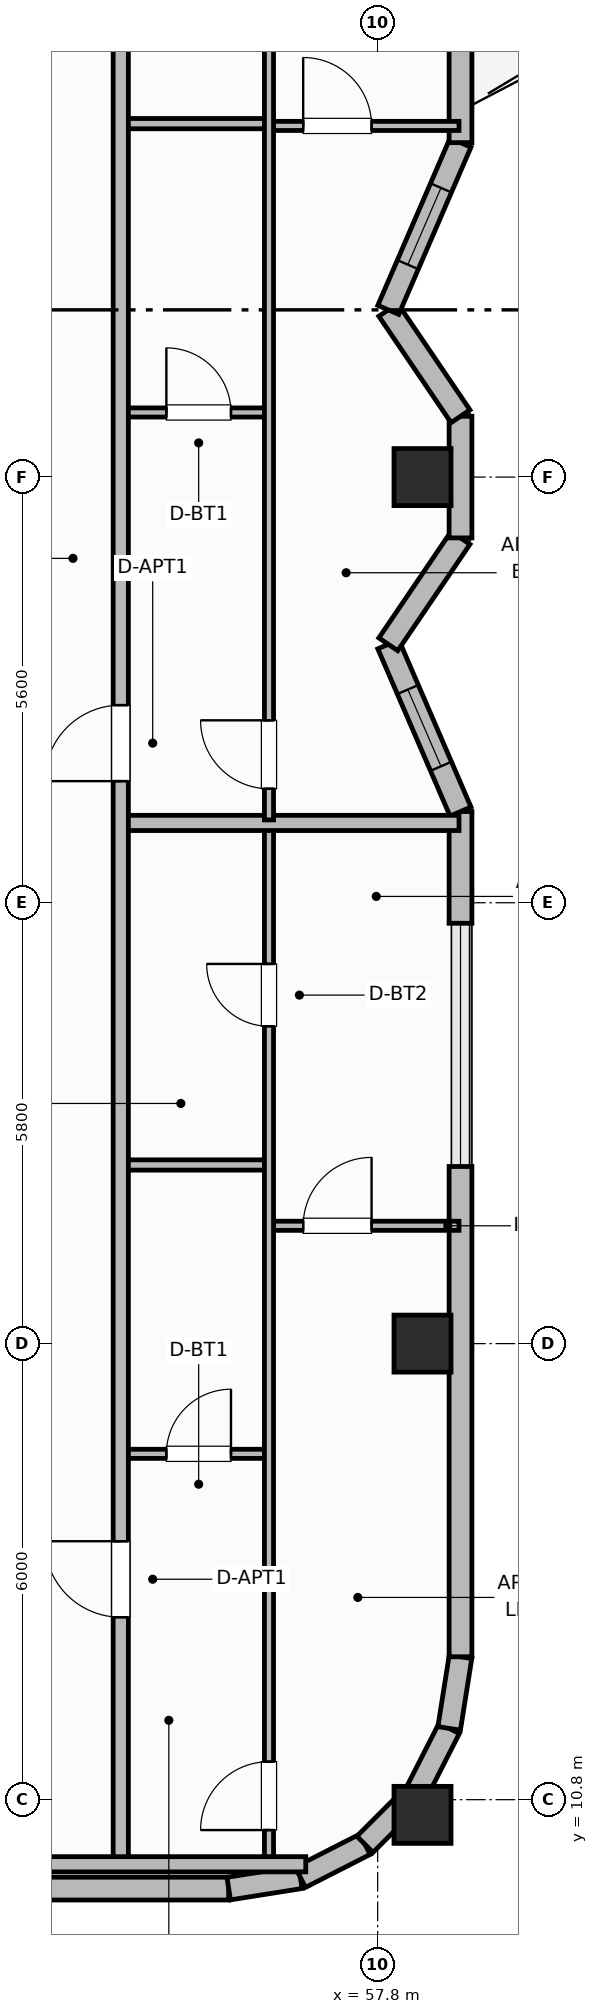
"""IFC4 building model, lengths in metres.
Left out: names, types, materials, properties, quantities, classifications, styles, units other than length and angle.
Written with IfcOpenShell. Run it as: python <this file> out.ifc"""

import sys

from ifc_helpers import new_model, si_unit, direction, frame, frame_2d, origin, origin_2d, place, context, subcontext, project, spatial, rectangle, extrude, element, fill, save


model = new_model("IFC4")
c1 = context("Model", 3, precision=1e-05, world=origin(), true_north=direction((0.0, 1.0)))
c2 = subcontext(c1, "Body", "Model", "MODEL_VIEW")
j1 = project(units=[si_unit("LENGTHUNIT", "METRE"), si_unit("PLANEANGLEUNIT", "RADIAN")], contexts=[c1])
p1 = place(None, origin())
s1 = spatial("IfcSite", under=j1, at=p1, CompositionType="ELEMENT")
p2 = place(p1, origin())
s2 = spatial("IfcBuilding", under=s1, at=p2, CompositionType="ELEMENT")
p3 = place(p2, frame((0.0, 0.0, 289.8)))
s3 = spatial("IfcBuildingStorey", under=s2, at=p3, CompositionType="ELEMENT", Elevation=289.8)
for number, where, z_axis, x_axis in (
    (1, (58.39, 10.6, 0.0), (0.0, 0.0, 1.0), (1.0, 0.0, 0.0)),
    (2, (58.39, 16.8, 0.0), (0.0, 0.0, 1.0), (1.0, 0.0, 0.0)),
    (3, (58.39, 28.2, 0.0), (0.0, 0.0, 1.0), (1.0, 0.0, 0.0)),
):
    element("IfcColumn", number, at=place(p3, frame(where, z_axis=z_axis, x_axis=x_axis)), inside=s3, PredefinedType="COLUMN", context=c2, shape_type="SweptSolid", body=[
        extrude(rectangle(XDim=0.75, YDim=0.75, at=origin_2d()), origin(), (0.0, 0.0, 1.0), 3.7),
    ])
p4 = place(p3, frame((30.21, 9.63, 0.0), z_axis=(0.0, 0.0, 1.0), x_axis=(1.0, 0.0, 0.0)))
e4 = element("IfcWall", 4, at=p4, inside=s3, PredefinedType="SOLIDWALL", context=c2, shape_type="SweptSolid", body=[
    extrude(rectangle(XDim=25.63, YDim=0.3, at=frame_2d((12.815, 0.0))), origin(), (0.0, 0.0, 1.0), 2.73),
])
p5 = place(p4, frame((1.452, 0.0, 0.95)))
e5 = element("IfcOpeningElement", 5, at=p5, cuts=e4, PredefinedType="OPENING", context=c2, shape_type="SweptSolid", body=[
    extrude(rectangle(XDim=1.1, YDim=1.65, at=frame_2d((0.55, 0.825))), frame((0.0, 0.16, 0.0), z_axis=(0.0, -1.0, 0.0), x_axis=(1.0, 0.0, 0.0)), (0.0, 0.0, 1.0), 0.32),
])
p6 = place(p4, frame((6.858, 0.0, 0.95)))
e6 = element("IfcOpeningElement", 6, at=p6, cuts=e4, PredefinedType="OPENING", context=c2, shape_type="SweptSolid", body=[
    extrude(rectangle(XDim=1.1, YDim=1.65, at=frame_2d((0.55, 0.825))), frame((0.0, 0.16, 0.0), z_axis=(0.0, -1.0, 0.0), x_axis=(1.0, 0.0, 0.0)), (0.0, 0.0, 1.0), 0.32),
])
p7 = place(p4, frame((9.562, 0.0, 0.95)))
e7 = element("IfcOpeningElement", 7, at=p7, cuts=e4, PredefinedType="OPENING", context=c2, shape_type="SweptSolid", body=[
    extrude(rectangle(XDim=1.1, YDim=1.65, at=frame_2d((0.55, 0.825))), frame((0.0, 0.16, 0.0), z_axis=(0.0, -1.0, 0.0), x_axis=(1.0, 0.0, 0.0)), (0.0, 0.0, 1.0), 0.32),
])
p8 = place(p4, frame((14.968, 0.0, 0.95)))
e8 = element("IfcOpeningElement", 8, at=p8, cuts=e4, PredefinedType="OPENING", context=c2, shape_type="SweptSolid", body=[
    extrude(rectangle(XDim=1.1, YDim=1.65, at=frame_2d((0.55, 0.825))), frame((0.0, 0.16, 0.0), z_axis=(0.0, -1.0, 0.0), x_axis=(1.0, 0.0, 0.0)), (0.0, 0.0, 1.0), 0.32),
])
p9 = place(p4, frame((17.672, 0.0, 0.95)))
e9 = element("IfcOpeningElement", 9, at=p9, cuts=e4, PredefinedType="OPENING", context=c2, shape_type="SweptSolid", body=[
    extrude(rectangle(XDim=1.1, YDim=1.65, at=frame_2d((0.55, 0.825))), frame((0.0, 0.16, 0.0), z_axis=(0.0, -1.0, 0.0), x_axis=(1.0, 0.0, 0.0)), (0.0, 0.0, 1.0), 0.32),
])
p10 = place(p4, frame((20.025, 0.0, 0.95)))
e10 = element("IfcOpeningElement", 10, at=p10, cuts=e4, PredefinedType="OPENING", context=c2, shape_type="SweptSolid", body=[
    extrude(rectangle(XDim=1.1, YDim=1.65, at=frame_2d((0.55, 0.825))), frame((0.0, 0.16, 0.0), z_axis=(0.0, -1.0, 0.0), x_axis=(1.0, 0.0, 0.0)), (0.0, 0.0, 1.0), 0.32),
])
p11 = place(p3, frame((55.84, 9.63, 0.0), z_axis=(0.0, 0.0, 1.0), x_axis=(0.987663181641, 0.156593229835, 0.0)))
e11 = element("IfcWall", 11, at=p11, inside=s3, PredefinedType="SOLIDWALL", context=c2, shape_type="SweptSolid", body=[
    extrude(rectangle(XDim=0.954, YDim=0.3, at=frame_2d((0.477, 0.0))), origin(), (0.0, 0.0, 1.0), 2.73),
])
for number, where, z_axis, x_axis in (
    (12, (56.782, 9.779, 0.0), (0.0, 0.0, 1.0), (0.891, 0.454, 0.0)),
    (13, (57.633, 10.212, 0.0), (0.0, 0.0, 1.0), (0.707, 0.707, 0.0)),
    (14, (58.308, 10.887, 0.0), (0.0, 0.0, 1.0), (0.454, 0.891, 0.0)),
):
    element("IfcWall", number, at=place(p3, frame(where, z_axis=z_axis, x_axis=x_axis)), inside=s3, PredefinedType="SOLIDWALL", context=c2, shape_type="SweptSolid", body=[
        extrude(rectangle(XDim=0.954, YDim=0.3, at=frame_2d((0.477, 0.0))), origin(), (0.0, 0.0, 1.0), 2.73),
    ])
p12 = place(p3, frame((58.741, 11.738, 0.0), z_axis=(0.0, 0.0, 1.0), x_axis=(0.156343617883, 0.987702725088, 0.0)))
e15 = element("IfcWall", 15, at=p12, inside=s3, PredefinedType="SOLIDWALL", context=c2, shape_type="SweptSolid", body=[
    extrude(rectangle(XDim=0.954, YDim=0.3, at=frame_2d((0.477, 0.0))), origin(), (0.0, 0.0, 1.0), 2.73),
])
p13 = place(p3, frame((58.89, 12.68, 0.0), z_axis=(0.0, 0.0, 1.0), x_axis=(0.0, 1.0, 0.0)))
e16 = element("IfcWall", 16, at=p13, inside=s3, PredefinedType="SOLIDWALL", context=c2, shape_type="SweptSolid", body=[
    extrude(rectangle(XDim=6.45, YDim=0.3, at=frame_2d((3.225, 0.0))), origin(), (0.0, 0.0, 1.0), 2.73),
])
p14 = place(p3, frame((58.89, 22.33, 0.0), z_axis=(0.0, 0.0, 1.0), x_axis=(0.0, 1.0, 0.0)))
e17 = element("IfcWall", 17, at=p14, inside=s3, PredefinedType="SOLIDWALL", context=c2, shape_type="SweptSolid", body=[
    extrude(rectangle(XDim=1.47, YDim=0.3, at=frame_2d((0.735, 0.0))), origin(), (0.0, 0.0, 1.0), 2.73),
])
p15 = place(p3, frame((58.89, 23.8, 0.0), z_axis=(0.0, 0.0, 1.0), x_axis=(-0.396426258231, 0.918066567186, 0.0)))
e18 = element("IfcWall", 18, at=p15, inside=s3, PredefinedType="SOLIDWALL", context=c2, shape_type="SweptSolid", body=[
    extrude(rectangle(XDim=2.396, YDim=0.3, at=frame_2d((1.198, 0.0))), origin(), (0.0, 0.0, 1.0), 2.73),
])
p16 = place(p15, frame((0.648, 0.0, 0.92)))
e19 = element("IfcOpeningElement", 19, at=p16, cuts=e18, PredefinedType="OPENING", context=c2, shape_type="SweptSolid", body=[
    extrude(rectangle(XDim=1.1, YDim=1.65, at=frame_2d((0.55, 0.825))), frame((0.0, 0.16, 0.0), z_axis=(0.0, -1.0, 0.0), x_axis=(1.0, 0.0, 0.0)), (0.0, 0.0, 1.0), 0.32),
])
p17 = place(p3, frame((57.94, 26.0, 0.0), z_axis=(0.0, 0.0, 1.0), x_axis=(0.561508476251, 0.827470985049, 0.0)))
e20 = element("IfcWall", 20, at=p17, inside=s3, PredefinedType="SOLIDWALL", context=c2, shape_type="SweptSolid", body=[
    extrude(rectangle(XDim=1.692, YDim=0.3, at=frame_2d((0.846, 0.0))), origin(), (0.0, 0.0, 1.0), 2.73),
])
p18 = place(p3, frame((58.89, 27.4, 0.0), z_axis=(0.0, 0.0, 1.0), x_axis=(0.0, 1.0, 0.0)))
e21 = element("IfcWall", 21, at=p18, inside=s3, PredefinedType="SOLIDWALL", context=c2, shape_type="SweptSolid", body=[
    extrude(rectangle(XDim=1.6, YDim=0.3, at=frame_2d((0.8, 0.0))), origin(), (0.0, 0.0, 1.0), 2.73),
])
p19 = place(p3, frame((58.89, 29.0, 0.0), z_axis=(0.0, 0.0, 1.0), x_axis=(-0.561508476251, 0.827470985049, 0.0)))
e22 = element("IfcWall", 22, at=p19, inside=s3, PredefinedType="SOLIDWALL", context=c2, shape_type="SweptSolid", body=[
    extrude(rectangle(XDim=1.692, YDim=0.3, at=frame_2d((0.846, 0.0))), origin(), (0.0, 0.0, 1.0), 2.73),
])
p20 = place(p3, frame((57.94, 30.4, 0.0), z_axis=(0.0, 0.0, 1.0), x_axis=(0.396389181543, 0.918082576218, 0.0)))
e23 = element("IfcWall", 23, at=p20, inside=s3, PredefinedType="SOLIDWALL", context=c2, shape_type="SweptSolid", body=[
    extrude(rectangle(XDim=2.396, YDim=0.3, at=frame_2d((1.198, 0.0))), origin(), (0.0, 0.0, 1.0), 2.73),
])
p21 = place(p20, frame((0.648, 0.0, 0.92)))
e24 = element("IfcOpeningElement", 24, at=p21, cuts=e23, PredefinedType="OPENING", context=c2, shape_type="SweptSolid", body=[
    extrude(rectangle(XDim=1.1, YDim=1.65, at=frame_2d((0.55, 0.825))), frame((0.0, 0.16, 0.0), z_axis=(0.0, -1.0, 0.0), x_axis=(1.0, 0.0, 0.0)), (0.0, 0.0, 1.0), 0.32),
])
p22 = place(p3, frame((58.89, 32.6, 0.0), z_axis=(0.0, 0.0, 1.0), x_axis=(0.0, 1.0, 0.0)))
e25 = element("IfcWall", 25, at=p22, inside=s3, PredefinedType="SOLIDWALL", context=c2, shape_type="SweptSolid", body=[
    extrude(rectangle(XDim=11.12, YDim=0.3, at=frame_2d((5.56, 0.0))), origin(), (0.0, 0.0, 1.0), 2.73),
])
p23 = place(p22, frame((2.1, 0.0, 0.0)))
e26 = element("IfcOpeningElement", 26, at=p23, cuts=e25, PredefinedType="OPENING", context=c2, shape_type="SweptSolid", body=[
    extrude(rectangle(XDim=1.6, YDim=2.1, at=frame_2d((0.8, 1.05))), frame((0.0, 0.16, 0.0), z_axis=(0.0, -1.0, 0.0), x_axis=(1.0, 0.0, 0.0)), (0.0, 0.0, 1.0), 0.32),
])
p24 = place(p22, frame((8.283, 0.0, 0.76)))
e27 = element("IfcOpeningElement", 27, at=p24, cuts=e25, PredefinedType="OPENING", context=c2, shape_type="SweptSolid", body=[
    extrude(rectangle(XDim=1.8, YDim=1.85, at=frame_2d((0.9, 0.925))), frame((0.0, 0.16, 0.0), z_axis=(0.0, -1.0, 0.0), x_axis=(1.0, 0.0, 0.0)), (0.0, 0.0, 1.0), 0.32),
])
p25 = place(p3, frame((54.42, 15.35, 0.0), z_axis=(0.0, 0.0, 1.0), x_axis=(1.0, 0.0, 0.0)))
e28 = element("IfcWall", 28, at=p25, inside=s3, PredefinedType="PARTITIONING", context=c2, shape_type="SweptSolid", body=[
    extrude(rectangle(XDim=1.95, YDim=0.12, at=frame_2d((0.975, 0.0))), origin(), (0.0, 0.0, 1.0), 2.56),
])
p26 = place(p25, frame((0.6, 0.0, 0.0)))
e29 = element("IfcOpeningElement", 29, at=p26, cuts=e28, PredefinedType="OPENING", context=c2, shape_type="SweptSolid", body=[
    extrude(rectangle(XDim=0.85, YDim=2.1, at=frame_2d((0.425, 1.05))), frame((0.0, 0.07, 0.0), z_axis=(0.0, -1.0, 0.0), x_axis=(1.0, 0.0, 0.0)), (0.0, 0.0, 1.0), 0.14),
])
p27 = place(p3, frame((54.42, 19.15, 0.0), z_axis=(0.0, 0.0, 1.0), x_axis=(1.0, 0.0, 0.0)))
e30 = element("IfcWall", 30, at=p27, inside=s3, PredefinedType="PARTITIONING", context=c2, shape_type="SweptSolid", body=[
    extrude(rectangle(XDim=1.95, YDim=0.135, at=frame_2d((0.975, 0.0))), origin(), (0.0, 0.0, 1.0), 2.56),
])
p28 = place(p3, frame((56.37, 18.35, 0.0), z_axis=(0.0, 0.0, 1.0), x_axis=(1.0, 0.0, 0.0)))
e31 = element("IfcWall", 31, at=p28, inside=s3, PredefinedType="PARTITIONING", context=c2, shape_type="SweptSolid", body=[
    extrude(rectangle(XDim=2.5, YDim=0.12, at=frame_2d((1.25, 0.0))), origin(), (0.0, 0.0, 1.0), 2.56),
])
p29 = place(p28, frame((0.45, 0.0, 0.0)))
e32 = element("IfcOpeningElement", 32, at=p29, cuts=e31, PredefinedType="OPENING", context=c2, shape_type="SweptSolid", body=[
    extrude(rectangle(XDim=0.9, YDim=2.1, at=frame_2d((0.45, 1.05))), frame((0.0, 0.07, 0.0), z_axis=(0.0, -1.0, 0.0), x_axis=(1.0, 0.0, 0.0)), (0.0, 0.0, 1.0), 0.14),
])
p30 = place(p3, frame((56.37, 9.99, 0.0), z_axis=(0.0, 0.0, 1.0), x_axis=(0.0, 1.0, 0.0)))
e33 = element("IfcWall", 33, at=p30, inside=s3, PredefinedType="PARTITIONING", context=c2, shape_type="SweptSolid", body=[
    extrude(rectangle(XDim=13.62, YDim=0.12, at=frame_2d((6.81, 0.0))), origin(), (0.0, 0.0, 1.0), 2.56),
])
p31 = place(p30, frame((0.41, 0.0, 0.0)))
e34 = element("IfcOpeningElement", 34, at=p31, cuts=e33, PredefinedType="OPENING", context=c2, shape_type="SweptSolid", body=[
    extrude(rectangle(XDim=0.9, YDim=2.1, at=frame_2d((0.45, 1.05))), frame((0.0, 0.07, 0.0), z_axis=(0.0, -1.0, 0.0), x_axis=(1.0, 0.0, 0.0)), (0.0, 0.0, 1.0), 0.14),
])
p32 = place(p30, frame((10.985, 0.0, 0.0)))
e35 = element("IfcOpeningElement", 35, at=p32, cuts=e33, PredefinedType="OPENING", context=c2, shape_type="SweptSolid", body=[
    extrude(rectangle(XDim=0.82, YDim=2.08, at=frame_2d((0.41, 1.04))), frame((0.0, 0.07, 0.0), z_axis=(0.0, -1.0, 0.0), x_axis=(1.0, 0.0, 0.0)), (0.0, 0.0, 1.0), 0.14),
])
p33 = place(p3, frame((54.42, 23.65, 0.0), z_axis=(0.0, 0.0, 1.0), x_axis=(1.0, 0.0, 0.0)))
e36 = element("IfcWall", 36, at=p33, inside=s3, PredefinedType="PARTITIONING", context=c2, shape_type="SweptSolid", body=[
    extrude(rectangle(XDim=4.45, YDim=0.2, at=frame_2d((2.225, 0.0))), origin(), (0.0, 0.0, 1.0), 2.56),
])
p34 = place(p3, frame((54.42, 29.05, 0.0), z_axis=(0.0, 0.0, 1.0), x_axis=(1.0, 0.0, 0.0)))
e37 = element("IfcWall", 37, at=p34, inside=s3, PredefinedType="PARTITIONING", context=c2, shape_type="SweptSolid", body=[
    extrude(rectangle(XDim=1.95, YDim=0.12, at=frame_2d((0.975, 0.0))), origin(), (0.0, 0.0, 1.0), 2.56),
])
p35 = place(p34, frame((0.6, 0.0, 0.0)))
e38 = element("IfcOpeningElement", 38, at=p35, cuts=e37, PredefinedType="OPENING", context=c2, shape_type="SweptSolid", body=[
    extrude(rectangle(XDim=0.85, YDim=2.1, at=frame_2d((0.425, 1.05))), frame((0.0, 0.07, 0.0), z_axis=(0.0, -1.0, 0.0), x_axis=(1.0, 0.0, 0.0)), (0.0, 0.0, 1.0), 0.14),
])
p36 = place(p3, frame((54.42, 32.85, 0.0), z_axis=(0.0, 0.0, 1.0), x_axis=(1.0, 0.0, 0.0)))
e39 = element("IfcWall", 39, at=p36, inside=s3, PredefinedType="PARTITIONING", context=c2, shape_type="SweptSolid", body=[
    extrude(rectangle(XDim=1.95, YDim=0.135, at=frame_2d((0.975, 0.0))), origin(), (0.0, 0.0, 1.0), 2.56),
])
p37 = place(p3, frame((56.37, 32.82, 0.0), z_axis=(0.0, 0.0, 1.0), x_axis=(1.0, 0.0, 0.0)))
e40 = element("IfcWall", 40, at=p37, inside=s3, PredefinedType="PARTITIONING", context=c2, shape_type="SweptSolid", body=[
    extrude(rectangle(XDim=2.5, YDim=0.12, at=frame_2d((1.25, 0.0))), origin(), (0.0, 0.0, 1.0), 2.56),
])
p38 = place(p37, frame((0.45, 0.0, 0.0)))
e41 = element("IfcOpeningElement", 41, at=p38, cuts=e40, PredefinedType="OPENING", context=c2, shape_type="SweptSolid", body=[
    extrude(rectangle(XDim=0.9, YDim=2.1, at=frame_2d((0.45, 1.05))), frame((0.0, 0.07, 0.0), z_axis=(0.0, -1.0, 0.0), x_axis=(1.0, 0.0, 0.0)), (0.0, 0.0, 1.0), 0.14),
])
p39 = place(p3, frame((56.37, 23.69, 0.0), z_axis=(0.0, 0.0, 1.0), x_axis=(0.0, 1.0, 0.0)))
e42 = element("IfcWall", 42, at=p39, inside=s3, PredefinedType="PARTITIONING", context=c2, shape_type="SweptSolid", body=[
    extrude(rectangle(XDim=22.72, YDim=0.12, at=frame_2d((11.36, 0.0))), origin(), (0.0, 0.0, 1.0), 2.56),
])
p40 = place(p39, frame((0.41, 0.0, 0.0)))
e43 = element("IfcOpeningElement", 43, at=p40, cuts=e42, PredefinedType="OPENING", context=c2, shape_type="SweptSolid", body=[
    extrude(rectangle(XDim=0.9, YDim=2.1, at=frame_2d((0.45, 1.05))), frame((0.0, 0.07, 0.0), z_axis=(0.0, -1.0, 0.0), x_axis=(1.0, 0.0, 0.0)), (0.0, 0.0, 1.0), 0.14),
])
p41 = place(p39, frame((13.185, 0.0, 0.0)))
e44 = element("IfcOpeningElement", 44, at=p41, cuts=e42, PredefinedType="OPENING", context=c2, shape_type="SweptSolid", body=[
    extrude(rectangle(XDim=0.82, YDim=2.08, at=frame_2d((0.41, 1.04))), frame((0.0, 0.07, 0.0), z_axis=(0.0, -1.0, 0.0), x_axis=(1.0, 0.0, 0.0)), (0.0, 0.0, 1.0), 0.14),
])
p42 = place(p3, frame((54.42, 9.95, 0.0), z_axis=(0.0, 0.0, 1.0), x_axis=(0.0, 1.0, 0.0)))
e45 = element("IfcWall", 45, at=p42, inside=s3, PredefinedType="PARTITIONING", context=c2, shape_type="SweptSolid", body=[
    extrude(rectangle(XDim=36.5, YDim=0.2, at=frame_2d((18.25, 0.0))), origin(), (0.0, 0.0, 1.0), 2.56),
])
p43 = place(p42, frame((3.25, 0.0, 0.0)))
e46 = element("IfcOpeningElement", 46, at=p43, cuts=e45, PredefinedType="OPENING", context=c2, shape_type="SweptSolid", body=[
    extrude(rectangle(XDim=1.0, YDim=2.15, at=frame_2d((0.5, 1.075))), frame((0.0, 0.11, 0.0), z_axis=(0.0, -1.0, 0.0), x_axis=(1.0, 0.0, 0.0)), (0.0, 0.0, 1.0), 0.22),
])
p44 = place(p42, frame((14.25, 0.0, 0.0)))
e47 = element("IfcOpeningElement", 47, at=p44, cuts=e45, PredefinedType="OPENING", context=c2, shape_type="SweptSolid", body=[
    extrude(rectangle(XDim=1.0, YDim=2.15, at=frame_2d((0.5, 1.075))), frame((0.0, 0.11, 0.0), z_axis=(0.0, -1.0, 0.0), x_axis=(1.0, 0.0, 0.0)), (0.0, 0.0, 1.0), 0.22),
])
p45 = place(p3, frame((53.1, 9.95, 0.0), z_axis=(0.0, 0.0, 1.0), x_axis=(1.0, 0.0, 0.0)))
e48 = element("IfcWall", 48, at=p45, inside=s3, PredefinedType="PARTITIONING", context=c2, shape_type="SweptSolid", body=[
    extrude(rectangle(XDim=3.754, YDim=0.2, at=frame_2d((1.877, 0.0))), origin(), (0.0, 0.0, 1.0), 2.56),
])
p46 = place(p16, origin())
e49 = element("IfcWindow", 49, at=p46, inside=s3, PartitioningType="SINGLE_PANEL", PredefinedType="WINDOW", context=c2, shape_type="SweptSolid", body=[
    extrude(rectangle(XDim=1.1, YDim=1.65, at=frame_2d((0.55, 0.825))), frame((0.0, 0.03, 0.0), z_axis=(0.0, -1.0, 0.0), x_axis=(1.0, 0.0, 0.0)), (0.0, 0.0, 1.0), 0.06),
])
fill(e19, e49)
p47 = place(p21, origin())
e50 = element("IfcWindow", 50, at=p47, inside=s3, PartitioningType="SINGLE_PANEL", PredefinedType="WINDOW", context=c2, shape_type="SweptSolid", body=[
    extrude(rectangle(XDim=1.1, YDim=1.65, at=frame_2d((0.55, 0.825))), frame((0.0, 0.03, 0.0), z_axis=(0.0, -1.0, 0.0), x_axis=(1.0, 0.0, 0.0)), (0.0, 0.0, 1.0), 0.06),
])
fill(e24, e50)
p48 = place(p26, origin())
e51 = element("IfcDoor", 51, at=p48, inside=s3, OperationType="SINGLE_SWING_RIGHT", PredefinedType="DOOR", context=c2, shape_type="SweptSolid", body=[
    extrude(rectangle(XDim=0.85, YDim=2.1, at=frame_2d((0.425, 1.05))), frame((0.0, 0.025, 0.0), z_axis=(0.0, -1.0, 0.0), x_axis=(1.0, 0.0, 0.0)), (0.0, 0.0, 1.0), 0.05),
])
fill(e29, e51)
p49 = place(p29, origin())
e52 = element("IfcDoor", 52, at=p49, inside=s3, OperationType="SINGLE_SWING_RIGHT", PredefinedType="DOOR", context=c2, shape_type="SweptSolid", body=[
    extrude(rectangle(XDim=0.9, YDim=2.1, at=frame_2d((0.45, 1.05))), frame((0.0, 0.025, 0.0), z_axis=(0.0, -1.0, 0.0), x_axis=(1.0, 0.0, 0.0)), (0.0, 0.0, 1.0), 0.05),
])
fill(e32, e52)
p50 = place(p31, origin())
e53 = element("IfcDoor", 53, at=p50, inside=s3, OperationType="SINGLE_SWING_LEFT", PredefinedType="DOOR", context=c2, shape_type="SweptSolid", body=[
    extrude(rectangle(XDim=0.9, YDim=2.1, at=frame_2d((0.45, 1.05))), frame((0.0, 0.025, 0.0), z_axis=(0.0, -1.0, 0.0), x_axis=(1.0, 0.0, 0.0)), (0.0, 0.0, 1.0), 0.05),
])
fill(e34, e53)
p51 = place(p32, origin())
e54 = element("IfcDoor", 54, at=p51, inside=s3, OperationType="SINGLE_SWING_RIGHT", PredefinedType="DOOR", context=c2, shape_type="SweptSolid", body=[
    extrude(rectangle(XDim=0.82, YDim=2.08, at=frame_2d((0.41, 1.04))), frame((0.0, 0.025, 0.0), z_axis=(0.0, -1.0, 0.0), x_axis=(1.0, 0.0, 0.0)), (0.0, 0.0, 1.0), 0.05),
])
fill(e35, e54)
p52 = place(p35, origin())
e55 = element("IfcDoor", 55, at=p52, inside=s3, OperationType="SINGLE_SWING_LEFT", PredefinedType="DOOR", context=c2, shape_type="SweptSolid", body=[
    extrude(rectangle(XDim=0.85, YDim=2.1, at=frame_2d((0.425, 1.05))), frame((0.0, 0.025, 0.0), z_axis=(0.0, -1.0, 0.0), x_axis=(1.0, 0.0, 0.0)), (0.0, 0.0, 1.0), 0.05),
])
fill(e38, e55)
p53 = place(p38, origin())
e56 = element("IfcDoor", 56, at=p53, inside=s3, OperationType="SINGLE_SWING_LEFT", PredefinedType="DOOR", context=c2, shape_type="SweptSolid", body=[
    extrude(rectangle(XDim=0.9, YDim=2.1, at=frame_2d((0.45, 1.05))), frame((0.0, 0.025, 0.0), z_axis=(0.0, -1.0, 0.0), x_axis=(1.0, 0.0, 0.0)), (0.0, 0.0, 1.0), 0.05),
])
fill(e41, e56)
p54 = place(p40, origin())
e57 = element("IfcDoor", 57, at=p54, inside=s3, OperationType="SINGLE_SWING_RIGHT", PredefinedType="DOOR", context=c2, shape_type="SweptSolid", body=[
    extrude(rectangle(XDim=0.9, YDim=2.1, at=frame_2d((0.45, 1.05))), frame((0.0, 0.025, 0.0), z_axis=(0.0, -1.0, 0.0), x_axis=(1.0, 0.0, 0.0)), (0.0, 0.0, 1.0), 0.05),
])
fill(e43, e57)
p55 = place(p43, origin())
e58 = element("IfcDoor", 58, at=p55, inside=s3, OperationType="SINGLE_SWING_RIGHT", PredefinedType="DOOR", context=c2, shape_type="SweptSolid", body=[
    extrude(rectangle(XDim=1.0, YDim=2.15, at=frame_2d((0.5, 1.075))), frame((0.0, 0.025, 0.0), z_axis=(0.0, -1.0, 0.0), x_axis=(1.0, 0.0, 0.0)), (0.0, 0.0, 1.0), 0.05),
])
fill(e46, e58)
p56 = place(p44, origin())
e59 = element("IfcDoor", 59, at=p56, inside=s3, OperationType="SINGLE_SWING_LEFT", PredefinedType="DOOR", context=c2, shape_type="SweptSolid", body=[
    extrude(rectangle(XDim=1.0, YDim=2.15, at=frame_2d((0.5, 1.075))), frame((0.0, 0.025, 0.0), z_axis=(0.0, -1.0, 0.0), x_axis=(1.0, 0.0, 0.0)), (0.0, 0.0, 1.0), 0.05),
])
fill(e47, e59)
save(model, sys.argv[1])
